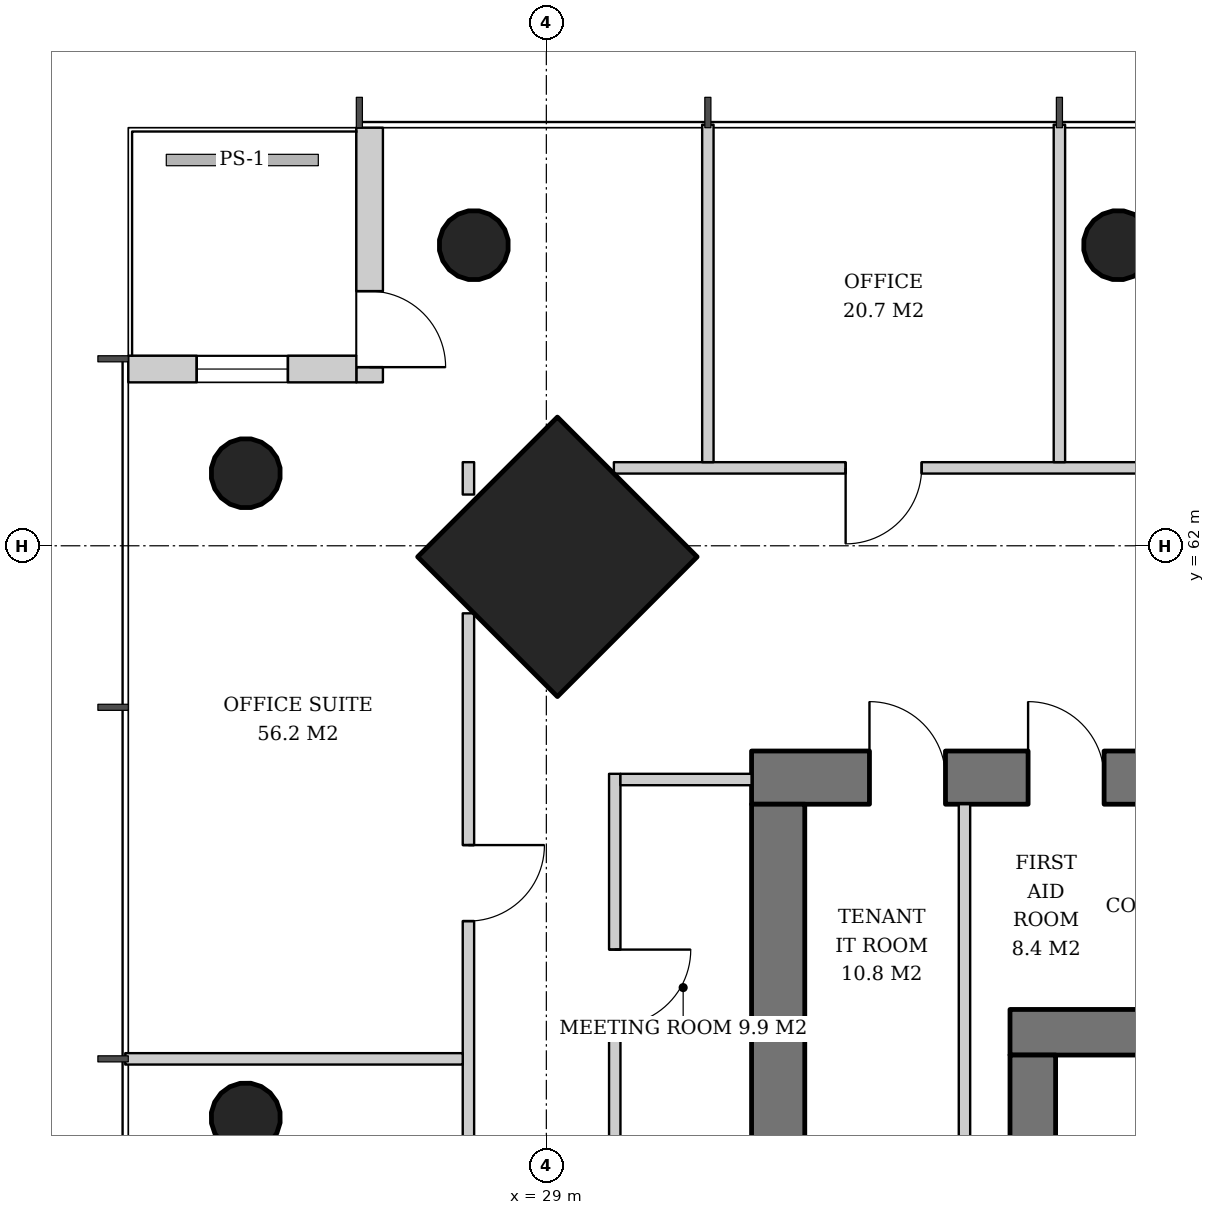
"""IFC4 building model, lengths in metres.
Left out: names, types, materials, properties, quantities, classifications, styles, units other than length and angle.
Written with IfcOpenShell. Run it as: python <this file> out.ifc"""

import sys

from ifc_helpers import new_model, si_unit, direction, frame, frame_2d, origin, origin_2d, place, context, subcontext, project, spatial, rectangle, hollow_circle, extrude, element, fill, save


model = new_model("IFC4")
c1 = context("Model", 3, precision=1e-05, world=origin(), true_north=direction((0.0, 1.0)))
c2 = subcontext(c1, "Body", "Model", "MODEL_VIEW")
j1 = project(units=[si_unit("LENGTHUNIT", "METRE"), si_unit("PLANEANGLEUNIT", "RADIAN")], contexts=[c1])
p1 = place(None, origin())
s1 = spatial("IfcSite", under=j1, at=p1, CompositionType="ELEMENT")
p2 = place(p1, origin())
s2 = spatial("IfcBuilding", under=s1, at=p2, CompositionType="ELEMENT")
p3 = place(p2, frame((0.0, 0.0, 146.4)))
s3 = spatial("IfcBuildingStorey", under=s2, at=p3, CompositionType="ELEMENT", Elevation=146.4)
p4 = place(p3, frame((29.107, 61.893, 0.0), z_axis=(0.031898107953, -0.031898107953, 0.998981992539), x_axis=(0.707106781187, 0.707106781187, 0.0)))
e1 = element("IfcColumn", 1, at=p4, inside=s3, PredefinedType="COLUMN", context=c2, shape_type="SweptSolid", body=[
    extrude(rectangle(XDim=2.6, YDim=2.6, at=origin_2d()), origin(), (0.0, 0.0, 1.0), 3.804),
])
p5 = place(p3, frame((28.007, 65.993, 0.0), z_axis=(0.031962158256, -0.031962158256, 0.998977898093), x_axis=(0.707106781187, 0.707106781187, 0.0)))
e2 = element("IfcColumn", 2, at=p5, inside=s3, PredefinedType="COLUMN", context=c2, shape_type="SweptSolid", body=[
    extrude(hollow_circle(Radius=0.457, WallThickness=0.03, at=origin_2d()), origin(), (0.0, 0.0, 1.0), 3.804),
])
p6 = place(p3, frame((36.504, 65.993, 0.0), z_axis=(0.015923015547, -0.031974442509, 0.999361842679), x_axis=(0.895145027055, 0.445775033553, 0.0)))
e3 = element("IfcColumn", 3, at=p6, inside=s3, PredefinedType="COLUMN", context=c2, shape_type="SweptSolid", body=[
    extrude(hollow_circle(Radius=0.457, WallThickness=0.03, at=origin_2d()), origin(), (0.0, 0.0, 1.0), 3.802),
])
p7 = place(p3, frame((25.007, 62.993, 0.0), z_axis=(0.031962158256, -0.031962158256, 0.998977898093), x_axis=(0.707106781187, 0.707106781187, 0.0)))
e4 = element("IfcColumn", 4, at=p7, inside=s3, PredefinedType="COLUMN", context=c2, shape_type="SweptSolid", body=[
    extrude(hollow_circle(Radius=0.457, WallThickness=0.03, at=origin_2d()), origin(), (0.0, 0.0, 1.0), 3.804),
])
p8 = place(p3, frame((25.007, 54.496, 0.0), z_axis=(0.031974442509, -0.015923015547, 0.999361842679), x_axis=(0.445775033553, 0.895145027055, 0.0)))
e5 = element("IfcColumn", 5, at=p8, inside=s3, PredefinedType="COLUMN", context=c2, shape_type="SweptSolid", body=[
    extrude(hollow_circle(Radius=0.457, WallThickness=0.03, at=origin_2d()), origin(), (0.0, 0.0, 1.0), 3.802),
])
p9 = place(p3, frame((35.1, 55.6, 0.0), z_axis=(0.0, 0.0, 1.0), x_axis=(1.0, 0.0, 0.0)))
e6 = element("IfcWall", 6, at=p9, inside=s3, PredefinedType="SHEAR", context=c2, shape_type="SweptSolid", body=[
    extrude(rectangle(XDim=19.8, YDim=0.6, at=frame_2d((9.9, 0.0))), origin(), (0.0, 0.0, 1.0), 3.8),
])
p10 = place(p9, frame((14.54, 0.0, 0.0)))
e7 = element("IfcOpeningElement", 7, at=p10, cuts=e6, PredefinedType="OPENING", context=c2, shape_type="SweptSolid", body=[
    extrude(rectangle(XDim=1.0, YDim=2.1, at=frame_2d((0.5, 1.05))), frame((0.0, 0.31, 0.0), z_axis=(0.0, -1.0, 0.0), x_axis=(1.0, 0.0, 0.0)), (0.0, 0.0, 1.0), 0.62),
])
p11 = place(p9, frame((2.425, 0.0, 0.0)))
e8 = element("IfcOpeningElement", 8, at=p11, cuts=e6, PredefinedType="OPENING", context=c2, shape_type="SweptSolid", body=[
    extrude(rectangle(XDim=1.0, YDim=2.1, at=frame_2d((0.5, 1.05))), frame((0.0, 0.31, 0.0), z_axis=(0.0, -1.0, 0.0), x_axis=(1.0, 0.0, 0.0)), (0.0, 0.0, 1.0), 0.62),
])
p12 = place(p3, frame((35.4, 36.7, 0.0), z_axis=(0.0, 0.0, 1.0), x_axis=(0.0, 1.0, 0.0)))
e9 = element("IfcWall", 9, at=p12, inside=s3, PredefinedType="SHEAR", context=c2, shape_type="SweptSolid", body=[
    extrude(rectangle(XDim=18.6, YDim=0.6, at=frame_2d((9.3, 0.0))), origin(), (0.0, 0.0, 1.0), 3.8),
])
p13 = place(p12, frame((8.4, 0.0, 0.0)))
e10 = element("IfcOpeningElement", 10, at=p13, cuts=e9, PredefinedType="OPENING", context=c2, shape_type="SweptSolid", body=[
    extrude(rectangle(XDim=1.8, YDim=2.4, at=frame_2d((0.9, 1.2))), frame((0.0, 0.31, 0.0), z_axis=(0.0, -1.0, 0.0), x_axis=(1.0, 0.0, 0.0)), (0.0, 0.0, 1.0), 0.62),
])
p14 = place(p3, frame((31.7, 58.95, 0.0), z_axis=(0.0, 0.0, 1.0), x_axis=(1.0, 0.0, 0.0)))
e11 = element("IfcWall", 11, at=p14, inside=s3, PredefinedType="SHEAR", context=c2, shape_type="SweptSolid", body=[
    extrude(rectangle(XDim=26.6, YDim=0.7, at=frame_2d((13.3, 0.0))), origin(), (0.0, 0.0, 1.0), 3.8),
])
p15 = place(p14, frame((17.94, 0.0, 0.0)))
e12 = element("IfcOpeningElement", 12, at=p15, cuts=e11, PredefinedType="OPENING", context=c2, shape_type="SweptSolid", body=[
    extrude(rectangle(XDim=1.0, YDim=2.1, at=frame_2d((0.5, 1.05))), frame((0.0, 0.36, 0.0), z_axis=(0.0, -1.0, 0.0), x_axis=(1.0, 0.0, 0.0)), (0.0, 0.0, 1.0), 0.72),
])
p16 = place(p14, frame((5.825, 0.0, 0.0)))
e13 = element("IfcOpeningElement", 13, at=p16, cuts=e11, PredefinedType="OPENING", context=c2, shape_type="SweptSolid", body=[
    extrude(rectangle(XDim=1.0, YDim=2.1, at=frame_2d((0.5, 1.05))), frame((0.0, 0.36, 0.0), z_axis=(0.0, -1.0, 0.0), x_axis=(1.0, 0.0, 0.0)), (0.0, 0.0, 1.0), 0.72),
])
p17 = place(p14, frame((1.551, 0.0, 0.0)))
e14 = element("IfcOpeningElement", 14, at=p17, cuts=e11, PredefinedType="OPENING", context=c2, shape_type="SweptSolid", body=[
    extrude(rectangle(XDim=1.0, YDim=2.1, at=frame_2d((0.5, 1.05))), frame((0.0, 0.36, 0.0), z_axis=(0.0, -1.0, 0.0), x_axis=(1.0, 0.0, 0.0)), (0.0, 0.0, 1.0), 0.72),
])
p18 = place(p14, frame((3.638, 0.0, 0.0)))
e15 = element("IfcOpeningElement", 15, at=p18, cuts=e11, PredefinedType="OPENING", context=c2, shape_type="SweptSolid", body=[
    extrude(rectangle(XDim=1.0, YDim=2.1, at=frame_2d((0.5, 1.05))), frame((0.0, 0.36, 0.0), z_axis=(0.0, -1.0, 0.0), x_axis=(1.0, 0.0, 0.0)), (0.0, 0.0, 1.0), 0.72),
])
p19 = place(p14, frame((8.342, 0.0, 0.0)))
e16 = element("IfcOpeningElement", 16, at=p19, cuts=e11, PredefinedType="OPENING", context=c2, shape_type="SweptSolid", body=[
    extrude(rectangle(XDim=1.0, YDim=2.1, at=frame_2d((0.5, 1.05))), frame((0.0, 0.36, 0.0), z_axis=(0.0, -1.0, 0.0), x_axis=(1.0, 0.0, 0.0)), (0.0, 0.0, 1.0), 0.72),
])
p20 = place(p14, frame((11.626, 0.0, 0.0)))
e17 = element("IfcOpeningElement", 17, at=p20, cuts=e11, PredefinedType="OPENING", context=c2, shape_type="SweptSolid", body=[
    extrude(rectangle(XDim=1.0, YDim=2.1, at=frame_2d((0.5, 1.05))), frame((0.0, 0.36, 0.0), z_axis=(0.0, -1.0, 0.0), x_axis=(1.0, 0.0, 0.0)), (0.0, 0.0, 1.0), 0.72),
])
p21 = place(p14, frame((14.862, 0.0, 0.0)))
e18 = element("IfcOpeningElement", 18, at=p21, cuts=e11, PredefinedType="OPENING", context=c2, shape_type="SweptSolid", body=[
    extrude(rectangle(XDim=1.0, YDim=2.1, at=frame_2d((0.5, 1.05))), frame((0.0, 0.36, 0.0), z_axis=(0.0, -1.0, 0.0), x_axis=(1.0, 0.0, 0.0)), (0.0, 0.0, 1.0), 0.72),
])
p22 = place(p14, frame((20.9, 0.0, 0.0)))
e19 = element("IfcOpeningElement", 19, at=p22, cuts=e11, PredefinedType="OPENING", context=c2, shape_type="SweptSolid", body=[
    extrude(rectangle(XDim=1.0, YDim=2.1, at=frame_2d((0.5, 1.05))), frame((0.0, 0.36, 0.0), z_axis=(0.0, -1.0, 0.0), x_axis=(1.0, 0.0, 0.0)), (0.0, 0.0, 1.0), 0.72),
])
p23 = place(p14, frame((23.75, 0.0, 0.0)))
e20 = element("IfcOpeningElement", 20, at=p23, cuts=e11, PredefinedType="OPENING", context=c2, shape_type="SweptSolid", body=[
    extrude(rectangle(XDim=1.0, YDim=2.1, at=frame_2d((0.5, 1.05))), frame((0.0, 0.36, 0.0), z_axis=(0.0, -1.0, 0.0), x_axis=(1.0, 0.0, 0.0)), (0.0, 0.0, 1.0), 0.72),
])
p24 = place(p3, frame((32.05, 33.4, 0.0), z_axis=(0.0, 0.0, 1.0), x_axis=(0.0, 1.0, 0.0)))
e21 = element("IfcWall", 21, at=p24, inside=s3, PredefinedType="SHEAR", context=c2, shape_type="SweptSolid", body=[
    extrude(rectangle(XDim=25.2, YDim=0.7, at=frame_2d((12.6, 0.0))), origin(), (0.0, 0.0, 1.0), 3.8),
])
p25 = place(p24, frame((11.7, 0.0, 0.0)))
e22 = element("IfcOpeningElement", 22, at=p25, cuts=e21, PredefinedType="OPENING", context=c2, shape_type="SweptSolid", body=[
    extrude(rectangle(XDim=1.8, YDim=2.4, at=frame_2d((0.9, 1.2))), frame((0.0, 0.36, 0.0), z_axis=(0.0, -1.0, 0.0), x_axis=(1.0, 0.0, 0.0)), (0.0, 0.0, 1.0), 0.72),
])
p26 = place(p24, frame((3.6, 0.0, 0.0)))
e23 = element("IfcOpeningElement", 23, at=p26, cuts=e21, PredefinedType="OPENING", context=c2, shape_type="SweptSolid", body=[
    extrude(rectangle(XDim=1.0, YDim=2.1, at=frame_2d((0.5, 1.05))), frame((0.0, 0.36, 0.0), z_axis=(0.0, -1.0, 0.0), x_axis=(1.0, 0.0, 0.0)), (0.0, 0.0, 1.0), 0.72),
])
p27 = place(p24, frame((6.35, 0.0, 0.0)))
e24 = element("IfcOpeningElement", 24, at=p27, cuts=e21, PredefinedType="OPENING", context=c2, shape_type="SweptSolid", body=[
    extrude(rectangle(XDim=1.0, YDim=2.1, at=frame_2d((0.5, 1.05))), frame((0.0, 0.36, 0.0), z_axis=(0.0, -1.0, 0.0), x_axis=(1.0, 0.0, 0.0)), (0.0, 0.0, 1.0), 0.72),
])
p28 = place(p24, frame((9.1, 0.0, 0.0)))
e25 = element("IfcOpeningElement", 25, at=p28, cuts=e21, PredefinedType="OPENING", context=c2, shape_type="SweptSolid", body=[
    extrude(rectangle(XDim=1.0, YDim=2.1, at=frame_2d((0.5, 1.05))), frame((0.0, 0.36, 0.0), z_axis=(0.0, -1.0, 0.0), x_axis=(1.0, 0.0, 0.0)), (0.0, 0.0, 1.0), 0.72),
])
p29 = place(p24, frame((15.1, 0.0, 0.0)))
e26 = element("IfcOpeningElement", 26, at=p29, cuts=e21, PredefinedType="OPENING", context=c2, shape_type="SweptSolid", body=[
    extrude(rectangle(XDim=1.0, YDim=2.1, at=frame_2d((0.5, 1.05))), frame((0.0, 0.36, 0.0), z_axis=(0.0, -1.0, 0.0), x_axis=(1.0, 0.0, 0.0)), (0.0, 0.0, 1.0), 0.72),
])
p30 = place(p24, frame((17.85, 0.0, 0.0)))
e27 = element("IfcOpeningElement", 27, at=p30, cuts=e21, PredefinedType="OPENING", context=c2, shape_type="SweptSolid", body=[
    extrude(rectangle(XDim=1.0, YDim=2.1, at=frame_2d((0.5, 1.05))), frame((0.0, 0.36, 0.0), z_axis=(0.0, -1.0, 0.0), x_axis=(1.0, 0.0, 0.0)), (0.0, 0.0, 1.0), 0.72),
])
p31 = place(p3, frame((26.675, 67.5, 0.0), z_axis=(0.0, 0.0, 1.0), x_axis=(0.0, -1.0, 0.0)))
e28 = element("IfcWall", 28, at=p31, inside=s3, PredefinedType="SOLIDWALL", context=c2, shape_type="SweptSolid", body=[
    extrude(rectangle(XDim=3.35, YDim=0.35, at=frame_2d((1.675, 0.0))), origin(), (0.0, 0.0, 1.0), 3.62),
])
p32 = place(p31, frame((2.15, 0.0, 0.0)))
e29 = element("IfcOpeningElement", 29, at=p32, cuts=e28, PredefinedType="OPENING", context=c2, shape_type="SweptSolid", body=[
    extrude(rectangle(XDim=1.0, YDim=2.4, at=frame_2d((0.5, 1.2))), frame((0.0, 0.185, 0.0), z_axis=(0.0, -1.0, 0.0), x_axis=(1.0, 0.0, 0.0)), (0.0, 0.0, 1.0), 0.37),
])
p33 = place(p3, frame((26.5, 64.325, 0.0), z_axis=(0.0, 0.0, 1.0), x_axis=(-1.0, 0.0, 0.0)))
e30 = element("IfcWall", 30, at=p33, inside=s3, PredefinedType="SOLIDWALL", context=c2, shape_type="SweptSolid", body=[
    extrude(rectangle(XDim=3.0, YDim=0.35, at=frame_2d((1.5, 0.0))), origin(), (0.0, 0.0, 1.0), 3.62),
])
p34 = place(p33, frame((0.9, 0.0, 0.6)))
e31 = element("IfcOpeningElement", 31, at=p34, cuts=e30, PredefinedType="OPENING", context=c2, shape_type="SweptSolid", body=[
    extrude(rectangle(XDim=1.2, YDim=2.55, at=frame_2d((0.6, 1.275))), frame((0.0, 0.185, 0.0), z_axis=(0.0, -1.0, 0.0), x_axis=(1.0, 0.0, 0.0)), (0.0, 0.0, 1.0), 0.37),
])
p35 = place(p3, frame((34.501, 53.25, 0.0), z_axis=(0.0, 0.0, 1.0), x_axis=(0.0, 1.0, 0.0)))
e32 = element("IfcWall", 32, at=p35, inside=s3, PredefinedType="SOLIDWALL", context=c2, shape_type="SweptSolid", body=[
    extrude(rectangle(XDim=5.35, YDim=0.15, at=frame_2d((2.675, 0.0))), origin(), (0.0, 0.0, 1.0), 3.62),
])
p36 = place(p3, frame((29.9, 59.0, 0.0), z_axis=(0.0, 0.0, 1.0), x_axis=(0.0, -1.0, 0.0)))
e33 = element("IfcWall", 33, at=p36, inside=s3, PredefinedType="PARTITIONING", context=c2, shape_type="SweptSolid", body=[
    extrude(rectangle(XDim=5.625, YDim=0.15, at=frame_2d((2.812, 0.0))), origin(), (0.0, 0.0, 1.0), 2.72),
])
p37 = place(p36, frame((2.312, 0.0, 0.0)))
e34 = element("IfcOpeningElement", 34, at=p37, cuts=e33, PredefinedType="OPENING", context=c2, shape_type="SweptSolid", body=[
    extrude(rectangle(XDim=1.0, YDim=2.1, at=frame_2d((0.5, 1.05))), frame((0.0, 0.085, 0.0), z_axis=(0.0, -1.0, 0.0), x_axis=(1.0, 0.0, 0.0)), (0.0, 0.0, 1.0), 0.17),
])
p38 = place(p3, frame((31.7, 58.925, 0.0), z_axis=(0.0, 0.0, 1.0), x_axis=(-1.0, 0.0, 0.0)))
e35 = element("IfcWall", 35, at=p38, inside=s3, PredefinedType="PARTITIONING", context=c2, shape_type="SweptSolid", body=[
    extrude(rectangle(XDim=1.725, YDim=0.15, at=frame_2d((0.862, 0.0))), origin(), (0.0, 0.0, 1.0), 2.72),
])
p39 = place(p3, frame((60.112, 63.025, 0.0), z_axis=(0.0, 0.0, 1.0), x_axis=(-1.0, 0.0, 0.0)))
e36 = element("IfcWall", 36, at=p39, inside=s3, PredefinedType="PARTITIONING", context=c2, shape_type="SweptSolid", body=[
    extrude(rectangle(XDim=30.223, YDim=0.15, at=frame_2d((15.112, 0.0))), origin(), (0.0, 0.0, 1.0), 2.72),
])
p40 = place(p39, frame((3.049, 0.0, 0.0)))
e37 = element("IfcOpeningElement", 37, at=p40, cuts=e36, PredefinedType="OPENING", context=c2, shape_type="SweptSolid", body=[
    extrude(rectangle(XDim=1.0, YDim=2.1, at=frame_2d((0.5, 1.05))), frame((0.0, 0.085, 0.0), z_axis=(0.0, -1.0, 0.0), x_axis=(1.0, 0.0, 0.0)), (0.0, 0.0, 1.0), 0.17),
])
p41 = place(p39, frame((7.674, 0.0, 0.0)))
e38 = element("IfcOpeningElement", 38, at=p41, cuts=e36, PredefinedType="OPENING", context=c2, shape_type="SweptSolid", body=[
    extrude(rectangle(XDim=1.0, YDim=2.1, at=frame_2d((0.5, 1.05))), frame((0.0, 0.085, 0.0), z_axis=(0.0, -1.0, 0.0), x_axis=(1.0, 0.0, 0.0)), (0.0, 0.0, 1.0), 0.17),
])
p42 = place(p39, frame((16.924, 0.0, 0.0)))
e39 = element("IfcOpeningElement", 39, at=p42, cuts=e36, PredefinedType="OPENING", context=c2, shape_type="SweptSolid", body=[
    extrude(rectangle(XDim=1.0, YDim=2.1, at=frame_2d((0.5, 1.05))), frame((0.0, 0.085, 0.0), z_axis=(0.0, -1.0, 0.0), x_axis=(1.0, 0.0, 0.0)), (0.0, 0.0, 1.0), 0.17),
])
p43 = place(p39, frame((26.174, 0.0, 0.0)))
e40 = element("IfcOpeningElement", 40, at=p43, cuts=e36, PredefinedType="OPENING", context=c2, shape_type="SweptSolid", body=[
    extrude(rectangle(XDim=1.0, YDim=2.1, at=frame_2d((0.5, 1.05))), frame((0.0, 0.085, 0.0), z_axis=(0.0, -1.0, 0.0), x_axis=(1.0, 0.0, 0.0)), (0.0, 0.0, 1.0), 0.17),
])
for number, where, z_axis, x_axis in (
    (41, (35.75, 63.1, 0.0), (0.0, 0.0, 1.0), (0.0, 1.0, 0.0)),
    (42, (31.125, 63.1, 0.0), (0.0, 0.0, 1.0), (0.0, 1.0, 0.0)),
):
    element("IfcWall", number, at=place(p3, frame(where, z_axis=z_axis, x_axis=x_axis)), inside=s3, PredefinedType="PARTITIONING", context=c2, shape_type="SweptSolid", body=[
        extrude(rectangle(XDim=4.44, YDim=0.15, at=frame_2d((2.22, 0.0))), origin(), (0.0, 0.0, 1.0), 2.82),
    ])
p44 = place(p3, frame((27.975, 63.1, 0.0), z_axis=(0.0, 0.0, 1.0), x_axis=(0.0, -1.0, 0.0)))
e43 = element("IfcWall", 43, at=p44, inside=s3, PredefinedType="PARTITIONING", context=c2, shape_type="SweptSolid", body=[
    extrude(rectangle(XDim=0.426, YDim=0.15, at=frame_2d((0.213, 0.0))), origin(), (0.0, 0.0, 1.0), 3.32),
])
p45 = place(p3, frame((27.975, 61.112, 0.0), z_axis=(0.0, 0.0, 1.0), x_axis=(0.0, -1.0, 0.0)))
e44 = element("IfcWall", 44, at=p45, inside=s3, PredefinedType="PARTITIONING", context=c2, shape_type="SweptSolid", body=[
    extrude(rectangle(XDim=30.223, YDim=0.15, at=frame_2d((15.112, 0.0))), origin(), (0.0, 0.0, 1.0), 2.72),
])
p46 = place(p45, frame((3.049, 0.0, 0.0)))
e45 = element("IfcOpeningElement", 45, at=p46, cuts=e44, PredefinedType="OPENING", context=c2, shape_type="SweptSolid", body=[
    extrude(rectangle(XDim=1.0, YDim=2.1, at=frame_2d((0.5, 1.05))), frame((0.0, 0.085, 0.0), z_axis=(0.0, -1.0, 0.0), x_axis=(1.0, 0.0, 0.0)), (0.0, 0.0, 1.0), 0.17),
])
p47 = place(p45, frame((7.674, 0.0, 0.0)))
e46 = element("IfcOpeningElement", 46, at=p47, cuts=e44, PredefinedType="OPENING", context=c2, shape_type="SweptSolid", body=[
    extrude(rectangle(XDim=1.0, YDim=2.1, at=frame_2d((0.5, 1.05))), frame((0.0, 0.085, 0.0), z_axis=(0.0, -1.0, 0.0), x_axis=(1.0, 0.0, 0.0)), (0.0, 0.0, 1.0), 0.17),
])
p48 = place(p45, frame((12.299, 0.0, 0.0)))
e47 = element("IfcOpeningElement", 47, at=p48, cuts=e44, PredefinedType="OPENING", context=c2, shape_type="SweptSolid", body=[
    extrude(rectangle(XDim=1.0, YDim=2.1, at=frame_2d((0.5, 1.05))), frame((0.0, 0.085, 0.0), z_axis=(0.0, -1.0, 0.0), x_axis=(1.0, 0.0, 0.0)), (0.0, 0.0, 1.0), 0.17),
])
p49 = place(p45, frame((17.024, 0.0, 0.0)))
e48 = element("IfcOpeningElement", 48, at=p49, cuts=e44, PredefinedType="OPENING", context=c2, shape_type="SweptSolid", body=[
    extrude(rectangle(XDim=0.8, YDim=2.1, at=frame_2d((0.4, 1.05))), frame((0.0, 0.085, 0.0), z_axis=(0.0, -1.0, 0.0), x_axis=(1.0, 0.0, 0.0)), (0.0, 0.0, 1.0), 0.17),
])
p50 = place(p45, frame((21.549, 0.0, 0.0)))
e49 = element("IfcOpeningElement", 49, at=p50, cuts=e44, PredefinedType="OPENING", context=c2, shape_type="SweptSolid", body=[
    extrude(rectangle(XDim=1.0, YDim=2.1, at=frame_2d((0.5, 1.05))), frame((0.0, 0.085, 0.0), z_axis=(0.0, -1.0, 0.0), x_axis=(1.0, 0.0, 0.0)), (0.0, 0.0, 1.0), 0.17),
])
p51 = place(p45, frame((26.274, 0.0, 0.0)))
e50 = element("IfcOpeningElement", 50, at=p51, cuts=e44, PredefinedType="OPENING", context=c2, shape_type="SweptSolid", body=[
    extrude(rectangle(XDim=0.8, YDim=2.1, at=frame_2d((0.4, 1.05))), frame((0.0, 0.085, 0.0), z_axis=(0.0, -1.0, 0.0), x_axis=(1.0, 0.0, 0.0)), (0.0, 0.0, 1.0), 0.17),
])
p52 = place(p3, frame((27.9, 55.25, 0.0), z_axis=(0.0, 0.0, 1.0), x_axis=(-1.0, 0.0, 0.0)))
e51 = element("IfcWall", 51, at=p52, inside=s3, PredefinedType="PARTITIONING", context=c2, shape_type="SweptSolid", body=[
    extrude(rectangle(XDim=4.44, YDim=0.15, at=frame_2d((2.22, 0.0))), origin(), (0.0, 0.0, 1.0), 2.82),
])
p53 = place(p32, origin())
e52 = element("IfcDoor", 52, at=p53, inside=s3, OperationType="SINGLE_SWING_RIGHT", PredefinedType="DOOR", context=c2, shape_type="SweptSolid", body=[
    extrude(rectangle(XDim=1.0, YDim=2.4, at=frame_2d((0.5, 1.2))), frame((0.0, 0.025, 0.0), z_axis=(0.0, -1.0, 0.0), x_axis=(1.0, 0.0, 0.0)), (0.0, 0.0, 1.0), 0.05),
])
fill(e29, e52)
p54 = place(p34, origin())
e53 = element("IfcWindow", 53, at=p54, inside=s3, PartitioningType="SINGLE_PANEL", PredefinedType="WINDOW", context=c2, shape_type="SweptSolid", body=[
    extrude(rectangle(XDim=1.2, YDim=2.55, at=frame_2d((0.6, 1.275))), frame((0.0, 0.03, 0.0), z_axis=(0.0, -1.0, 0.0), x_axis=(1.0, 0.0, 0.0)), (0.0, 0.0, 1.0), 0.06),
])
fill(e31, e53)
p55 = place(p17, origin())
e54 = element("IfcDoor", 54, at=p55, inside=s3, OperationType="SINGLE_SWING_LEFT", PredefinedType="DOOR", context=c2, shape_type="SweptSolid", body=[
    extrude(rectangle(XDim=1.0, YDim=2.1, at=frame_2d((0.5, 1.05))), frame((0.0, -0.29, 0.0), z_axis=(0.0, -1.0, 0.0), x_axis=(1.0, 0.0, 0.0)), (0.0, 0.0, 1.0), 0.05),
])
fill(e14, e54)
p56 = place(p18, origin())
e55 = element("IfcDoor", 55, at=p56, inside=s3, OperationType="SINGLE_SWING_LEFT", PredefinedType="DOOR", context=c2, shape_type="SweptSolid", body=[
    extrude(rectangle(XDim=1.0, YDim=2.1, at=frame_2d((0.5, 1.05))), frame((0.0, -0.29, 0.0), z_axis=(0.0, -1.0, 0.0), x_axis=(1.0, 0.0, 0.0)), (0.0, 0.0, 1.0), 0.05),
])
fill(e15, e55)
p57 = place(p37, origin())
e56 = element("IfcDoor", 56, at=p57, inside=s3, OperationType="SINGLE_SWING_LEFT", PredefinedType="DOOR", context=c2, shape_type="SweptSolid", body=[
    extrude(rectangle(XDim=1.0, YDim=2.1, at=frame_2d((0.5, 1.05))), frame((0.0, 0.025, 0.0), z_axis=(0.0, -1.0, 0.0), x_axis=(1.0, 0.0, 0.0)), (0.0, 0.0, 1.0), 0.05),
])
fill(e34, e56)
p58 = place(p43, origin())
e57 = element("IfcDoor", 57, at=p58, inside=s3, OperationType="SINGLE_SWING_RIGHT", PredefinedType="DOOR", context=c2, shape_type="SweptSolid", body=[
    extrude(rectangle(XDim=1.0, YDim=2.1, at=frame_2d((0.5, 1.05))), frame((0.0, 0.025, 0.0), z_axis=(0.0, -1.0, 0.0), x_axis=(1.0, 0.0, 0.0)), (0.0, 0.0, 1.0), 0.05),
])
fill(e40, e57)
p59 = place(p46, origin())
e58 = element("IfcDoor", 58, at=p59, inside=s3, OperationType="SINGLE_SWING_LEFT", PredefinedType="DOOR", context=c2, shape_type="SweptSolid", body=[
    extrude(rectangle(XDim=1.0, YDim=2.1, at=frame_2d((0.5, 1.05))), frame((0.0, 0.025, 0.0), z_axis=(0.0, -1.0, 0.0), x_axis=(1.0, 0.0, 0.0)), (0.0, 0.0, 1.0), 0.05),
])
fill(e45, e58)
save(model, sys.argv[1])
